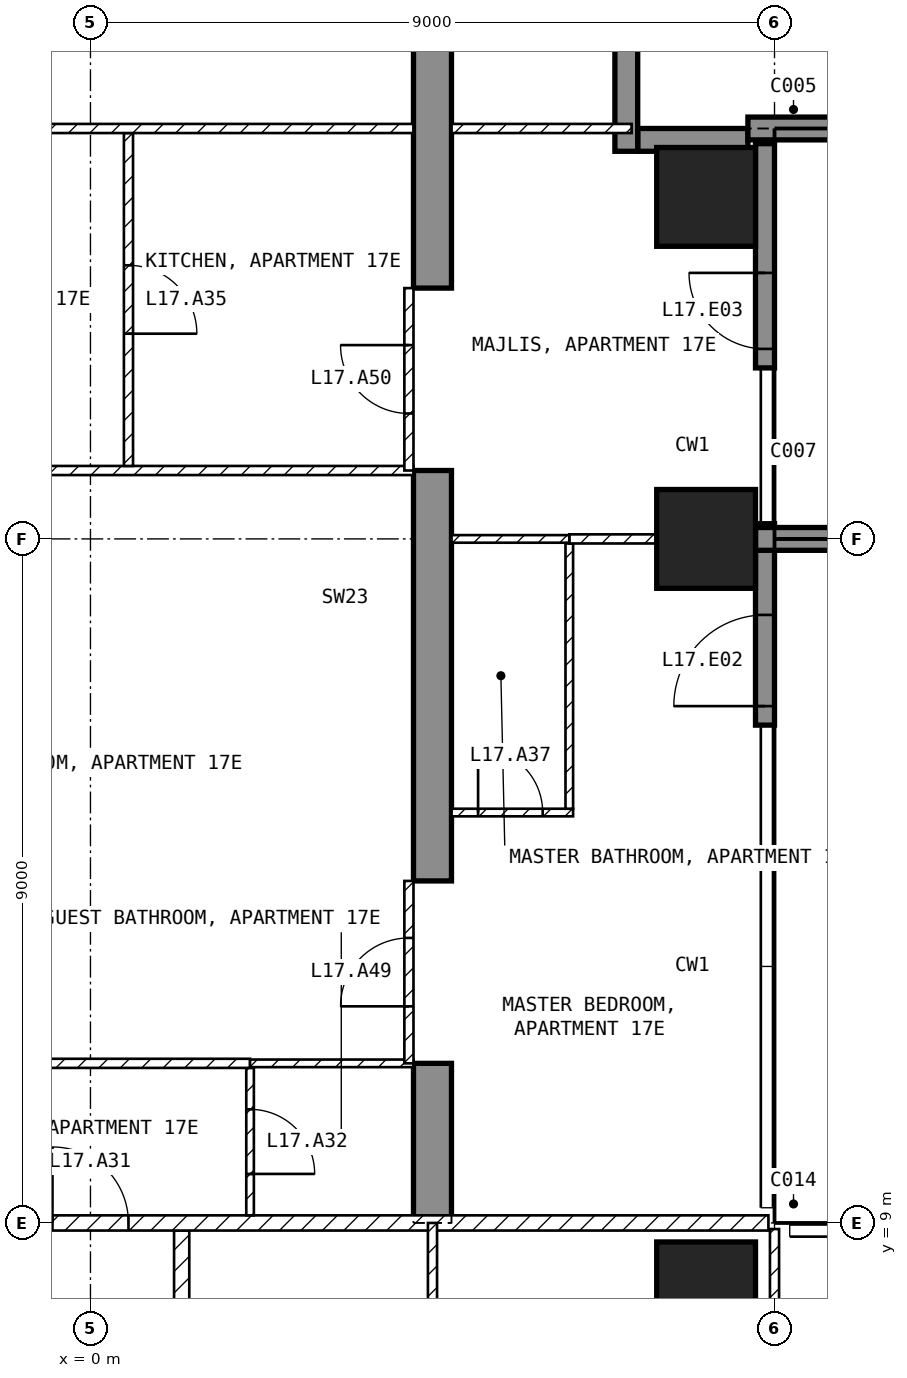
"""IFC4 building model, lengths in metres.
Left out: names, types, materials, properties, quantities, classifications, styles, units other than length and angle.
Written with IfcOpenShell. Run it as: python <this file> out.ifc"""

import sys

from ifc_helpers import new_model, si_unit, direction, frame, frame_2d, origin, origin_2d, place, context, subcontext, project, spatial, polyline, rectangle, outline, extrude, element, fill, save


model = new_model("IFC4")
c1 = context("Model", 3, precision=1e-05, world=origin(), true_north=direction((0.0, 1.0)))
c2 = subcontext(c1, "Body", "Model", "MODEL_VIEW")
j1 = project(units=[si_unit("LENGTHUNIT", "METRE"), si_unit("PLANEANGLEUNIT", "RADIAN")], contexts=[c1])
p1 = place(None, origin())
s1 = spatial("IfcSite", under=j1, at=p1, CompositionType="ELEMENT")
p2 = place(p1, origin())
s2 = spatial("IfcBuilding", under=s1, at=p2, CompositionType="ELEMENT")
p3 = place(p2, frame((0.0, 0.0, 78.5)))
s3 = spatial("IfcBuildingStorey", under=s2, at=p3, CompositionType="ELEMENT", Elevation=78.5)
for number, where, z_axis, x_axis in (
    (1, (8.1, 8.1, -0.25), (0.0, 0.0, 1.0), (1.0, 0.0, 0.0)),
    (2, (8.1, 18.0, -0.25), (0.0, 0.0, 1.0), (1.0, 0.0, 0.0)),
    (3, (8.1, 22.5, -0.25), (0.0, 0.0, 1.0), (1.0, 0.0, 0.0)),
):
    element("IfcColumn", number, at=place(p3, frame(where, z_axis=z_axis, x_axis=x_axis)), inside=s3, PredefinedType="COLUMN", context=c2, shape_type="SweptSolid", body=[
        extrude(rectangle(XDim=1.3, YDim=1.3, at=origin_2d()), origin(), (0.0, 0.0, 1.0), 3.5),
    ])
p4 = place(p3, frame((4.25, 9.0, -0.25), z_axis=(1.0, 0.0, 0.0), x_axis=(0.0, 1.0, 0.0)))
e4 = element("IfcWall", 4, at=p4, inside=s3, PredefinedType="SHEAR", context=c2, shape_type="SweptSolid", body=[
    extrude(outline(polyline([(0.0, 0.0), (2.1, 0.0), (2.1, 2.65), (4.5, 2.65), (4.5, 0.0), (9.9, 0.0), (9.9, 2.65), (12.3, 2.65), (12.3, 0.0), (16.45, 0.0), (16.45, 3.5), (0.0, 3.5), (0.0, 0.0)])), origin(), (0.0, 0.0, 1.0), 0.5),
])
p5 = place(p3, frame((8.875, 15.55, 0.0), z_axis=(0.0, 0.0, 1.0), x_axis=(0.0, 1.0, 0.0)))
e5 = element("IfcWall", 5, at=p5, inside=s3, PredefinedType="SOLIDWALL", context=c2, shape_type="SweptSolid", body=[
    extrude(rectangle(XDim=2.65, YDim=0.25, at=frame_2d((1.325, 0.0))), origin(), (0.0, 0.0, 1.0), 3.25),
])
p6 = place(p5, frame((0.25, 0.0, 0.0)))
e6 = element("IfcOpeningElement", 6, at=p6, cuts=e5, PredefinedType="OPENING", context=c2, shape_type="SweptSolid", body=[
    extrude(rectangle(XDim=1.2, YDim=2.4, at=frame_2d((0.6, 1.2))), frame((0.0, 0.135, 0.0), z_axis=(0.0, -1.0, 0.0), x_axis=(1.0, 0.0, 0.0)), (0.0, 0.0, 1.0), 0.27),
])
p7 = place(p3, frame((8.875, 20.25, 0.0), z_axis=(0.0, 0.0, 1.0), x_axis=(0.0, 1.0, 0.0)))
e7 = element("IfcWall", 7, at=p7, inside=s3, PredefinedType="SOLIDWALL", context=c2, shape_type="SweptSolid", body=[
    extrude(rectangle(XDim=2.95, YDim=0.25, at=frame_2d((1.475, 0.0))), origin(), (0.0, 0.0, 1.0), 3.25),
])
p8 = place(p7, frame((0.25, 0.0, 0.0)))
e8 = element("IfcOpeningElement", 8, at=p8, cuts=e7, PredefinedType="OPENING", context=c2, shape_type="SweptSolid", body=[
    extrude(rectangle(XDim=1.0, YDim=2.4, at=frame_2d((0.5, 1.2))), frame((0.0, 0.135, 0.0), z_axis=(0.0, -1.0, 0.0), x_axis=(1.0, 0.0, 0.0)), (0.0, 0.0, 1.0), 0.27),
])
p9 = place(p3, frame((8.65, 23.25, 0.0), z_axis=(0.0, 0.0, 1.0), x_axis=(-1.0, 0.0, 0.0)))
e9 = element("IfcWall", 9, at=p9, inside=s3, PredefinedType="SOLIDWALL", context=c2, shape_type="SweptSolid", body=[
    extrude(rectangle(XDim=1.45, YDim=0.3, at=frame_2d((0.725, 0.0))), origin(), (0.0, 0.0, 1.0), 3.25),
])
p10 = place(p3, frame((7.05, 23.1, 0.0), z_axis=(0.0, 0.0, 1.0), x_axis=(0.0, 1.0, 0.0)))
e10 = element("IfcWall", 10, at=p10, inside=s3, PredefinedType="SOLIDWALL", context=c2, shape_type="SweptSolid", body=[
    extrude(rectangle(XDim=1.8, YDim=0.3, at=frame_2d((0.9, 0.0))), origin(), (0.0, 0.0, 1.0), 3.25),
])
p11 = place(p3, frame((8.75, 18.0, 0.0), z_axis=(0.0, 0.0, 1.0), x_axis=(1.0, 0.0, 0.0)))
e11 = element("IfcWall", 11, at=p11, inside=s3, PredefinedType="SOLIDWALL", context=c2, shape_type="SweptSolid", body=[
    extrude(rectangle(XDim=2.95, YDim=0.3, at=frame_2d((1.475, 0.0))), origin(), (0.0, 0.0, 1.0), 3.25),
])
p12 = place(p3, frame((8.65, 23.4, 0.0), z_axis=(0.0, 0.0, 1.0), x_axis=(1.0, 0.0, 0.0)))
e12 = element("IfcWall", 12, at=p12, inside=s3, PredefinedType="SOLIDWALL", context=c2, shape_type="SweptSolid", body=[
    extrude(rectangle(XDim=3.05, YDim=0.3, at=frame_2d((1.525, 0.0))), origin(), (0.0, 0.0, 1.0), 3.25),
])
p13 = place(p3, frame((1.2, 8.9, 0.0), z_axis=(0.0, 0.0, 1.0), x_axis=(0.0, -1.0, 0.0)))
e13 = element("IfcWall", 13, at=p13, inside=s3, PredefinedType="PARTITIONING", context=c2, shape_type="SweptSolid", body=[
    extrude(rectangle(XDim=7.6, YDim=0.2, at=frame_2d((3.8, 0.0))), origin(), (0.0, 0.0, 1.0), 3.25),
])
p14 = place(p3, frame((-8.92, 9.0, 0.0), z_axis=(0.0, 0.0, 1.0), x_axis=(1.0, 0.0, 0.0)))
e14 = element("IfcWall", 14, at=p14, inside=s3, PredefinedType="PARTITIONING", context=c2, shape_type="SweptSolid", body=[
    extrude(rectangle(XDim=17.84, YDim=0.2, at=frame_2d((8.92, 0.0))), origin(), (0.0, 0.0, 1.0), 3.25),
])
p15 = place(p14, frame((8.42, 0.0, 0.0)))
e15 = element("IfcOpeningElement", 15, at=p15, cuts=e14, PredefinedType="OPENING", context=c2, shape_type="SweptSolid", body=[
    extrude(rectangle(XDim=1.0, YDim=2.1, at=frame_2d((0.5, 1.05))), frame((0.0, 0.11, 0.0), z_axis=(0.0, -1.0, 0.0), x_axis=(1.0, 0.0, 0.0)), (0.0, 0.0, 1.0), 0.22),
])
p16 = place(p3, frame((9.0, 1.3, 0.0), z_axis=(0.0, 0.0, 1.0), x_axis=(0.0, 1.0, 0.0)))
e16 = element("IfcWall", 16, at=p16, inside=s3, PredefinedType="PARTITIONING", context=c2, shape_type="SweptSolid", body=[
    extrude(rectangle(XDim=7.62, YDim=0.12, at=frame_2d((3.81, 0.0))), origin(), (0.0, 0.0, 1.0), 3.25),
])
p17 = place(p16, frame((4.05, 0.0, 0.0)))
e17 = element("IfcOpeningElement", 17, at=p17, cuts=e16, PredefinedType="OPENING", context=c2, shape_type="SweptSolid", body=[
    extrude(rectangle(XDim=0.9, YDim=2.1, at=frame_2d((0.45, 1.05))), frame((0.0, 0.07, 0.0), z_axis=(0.0, -1.0, 0.0), x_axis=(1.0, 0.0, 0.0)), (0.0, 0.0, 1.0), 0.14),
])
p18 = place(p3, frame((4.5, 1.3, 0.0), z_axis=(0.0, 0.0, 1.0), x_axis=(0.0, 1.0, 0.0)))
e18 = element("IfcWall", 18, at=p18, inside=s3, PredefinedType="PARTITIONING", context=c2, shape_type="SweptSolid", body=[
    extrude(rectangle(XDim=7.7, YDim=0.12, at=frame_2d((3.85, 0.0))), origin(), (0.0, 0.0, 1.0), 3.25),
])
p19 = place(p18, frame((3.4, 0.0, 0.0)))
e19 = element("IfcOpeningElement", 19, at=p19, cuts=e18, PredefinedType="OPENING", context=c2, shape_type="SweptSolid", body=[
    extrude(rectangle(XDim=0.9, YDim=2.1, at=frame_2d((0.45, 1.05))), frame((0.0, 0.07, 0.0), z_axis=(0.0, -1.0, 0.0), x_axis=(1.0, 0.0, 0.0)), (0.0, 0.0, 1.0), 0.14),
])
p20 = place(p3, frame((2.1, 11.04, 0.0), z_axis=(0.0, 0.0, 1.0), x_axis=(0.0, -1.0, 0.0)))
e20 = element("IfcWall", 20, at=p20, inside=s3, PredefinedType="PARTITIONING", context=c2, shape_type="SweptSolid", body=[
    extrude(rectangle(XDim=1.94, YDim=0.1, at=frame_2d((0.97, 0.0))), origin(), (0.0, 0.0, 1.0), 3.25),
])
p21 = place(p20, frame((0.545, 0.0, 0.0)))
e21 = element("IfcOpeningElement", 21, at=p21, cuts=e20, PredefinedType="OPENING", context=c2, shape_type="SweptSolid", body=[
    extrude(rectangle(XDim=0.85, YDim=2.1, at=frame_2d((0.425, 1.05))), frame((0.0, 0.06, 0.0), z_axis=(0.0, -1.0, 0.0), x_axis=(1.0, 0.0, 0.0)), (0.0, 0.0, 1.0), 0.12),
])
p22 = place(p3, frame((-4.25, 11.1, 0.0), z_axis=(0.0, 0.0, 1.0), x_axis=(1.0, 0.0, 0.0)))
e22 = element("IfcWall", 22, at=p22, inside=s3, PredefinedType="PARTITIONING", context=c2, shape_type="SweptSolid", body=[
    extrude(rectangle(XDim=6.35, YDim=0.12, at=frame_2d((3.175, 0.0))), origin(), (0.0, 0.0, 1.0), 3.25),
])
p23 = place(p22, frame((2.725, 0.0, 0.0)))
e23 = element("IfcOpeningElement", 23, at=p23, cuts=e22, PredefinedType="OPENING", context=c2, shape_type="SweptSolid", body=[
    extrude(rectangle(XDim=0.9, YDim=2.1, at=frame_2d((0.45, 1.05))), frame((0.0, 0.07, 0.0), z_axis=(0.0, -1.0, 0.0), x_axis=(1.0, 0.0, 0.0)), (0.0, 0.0, 1.0), 0.14),
])
p24 = place(p3, frame((2.1, 11.1, 0.0), z_axis=(0.0, 0.0, 1.0), x_axis=(1.0, 0.0, 0.0)))
e24 = element("IfcWall", 24, at=p24, inside=s3, PredefinedType="PARTITIONING", context=c2, shape_type="SweptSolid", body=[
    extrude(rectangle(XDim=2.15, YDim=0.1, at=frame_2d((1.075, 0.0))), origin(), (0.0, 0.0, 1.0), 3.25),
])
p25 = place(p3, frame((-4.25, 18.9, 0.0), z_axis=(0.0, 0.0, 1.0), x_axis=(1.0, 0.0, 0.0)))
e25 = element("IfcWall", 25, at=p25, inside=s3, PredefinedType="PARTITIONING", context=c2, shape_type="SweptSolid", body=[
    extrude(rectangle(XDim=8.5, YDim=0.12, at=frame_2d((4.25, 0.0))), origin(), (0.0, 0.0, 1.0), 3.25),
])
p26 = place(p25, frame((1.925, 0.0, 0.0)))
e26 = element("IfcOpeningElement", 26, at=p26, cuts=e25, PredefinedType="OPENING", context=c2, shape_type="SweptSolid", body=[
    extrude(rectangle(XDim=0.9, YDim=2.1, at=frame_2d((0.45, 1.05))), frame((0.0, 0.07, 0.0), z_axis=(0.0, -1.0, 0.0), x_axis=(1.0, 0.0, 0.0)), (0.0, 0.0, 1.0), 0.14),
])
p27 = place(p3, frame((0.5, 23.34, 0.0), z_axis=(0.0, 0.0, 1.0), x_axis=(0.0, -1.0, 0.0)))
e27 = element("IfcWall", 27, at=p27, inside=s3, PredefinedType="PARTITIONING", context=c2, shape_type="SweptSolid", body=[
    extrude(rectangle(XDim=4.38, YDim=0.12, at=frame_2d((2.19, 0.0))), origin(), (0.0, 0.0, 1.0), 3.25),
])
p28 = place(p27, frame((1.74, 0.0, 0.0)))
e28 = element("IfcOpeningElement", 28, at=p28, cuts=e27, PredefinedType="OPENING", context=c2, shape_type="SweptSolid", body=[
    extrude(rectangle(XDim=0.9, YDim=2.1, at=frame_2d((0.45, 1.05))), frame((0.0, 0.07, 0.0), z_axis=(0.0, -1.0, 0.0), x_axis=(1.0, 0.0, 0.0)), (0.0, 0.0, 1.0), 0.14),
])
p29 = place(p3, frame((-4.25, 23.4, 0.0), z_axis=(0.0, 0.0, 1.0), x_axis=(1.0, 0.0, 0.0)))
e29 = element("IfcWall", 29, at=p29, inside=s3, PredefinedType="PARTITIONING", context=c2, shape_type="SweptSolid", body=[
    extrude(rectangle(XDim=8.5, YDim=0.12, at=frame_2d((4.25, 0.0))), origin(), (0.0, 0.0, 1.0), 3.25),
])
p30 = place(p29, frame((1.925, 0.0, 0.0)))
e30 = element("IfcOpeningElement", 30, at=p30, cuts=e29, PredefinedType="OPENING", context=c2, shape_type="SweptSolid", body=[
    extrude(rectangle(XDim=0.9, YDim=2.1, at=frame_2d((0.45, 1.05))), frame((0.0, 0.07, 0.0), z_axis=(0.0, -1.0, 0.0), x_axis=(1.0, 0.0, 0.0)), (0.0, 0.0, 1.0), 0.14),
])
p31 = place(p3, frame((4.75, 14.4, 0.0), z_axis=(0.0, 0.0, 1.0), x_axis=(1.0, 0.0, 0.0)))
e31 = element("IfcWall", 31, at=p31, inside=s3, PredefinedType="PARTITIONING", context=c2, shape_type="SweptSolid", body=[
    extrude(rectangle(XDim=1.6, YDim=0.1, at=frame_2d((0.8, 0.0))), origin(), (0.0, 0.0, 1.0), 3.25),
])
p32 = place(p31, frame((0.35, 0.0, 0.0)))
e32 = element("IfcOpeningElement", 32, at=p32, cuts=e31, PredefinedType="OPENING", context=c2, shape_type="SweptSolid", body=[
    extrude(rectangle(XDim=0.85, YDim=2.1, at=frame_2d((0.425, 1.05))), frame((0.0, 0.06, 0.0), z_axis=(0.0, -1.0, 0.0), x_axis=(1.0, 0.0, 0.0)), (0.0, 0.0, 1.0), 0.12),
])
p33 = place(p3, frame((6.3, 14.45, 0.0), z_axis=(0.0, 0.0, 1.0), x_axis=(0.0, 1.0, 0.0)))
e33 = element("IfcWall", 33, at=p33, inside=s3, PredefinedType="PARTITIONING", context=c2, shape_type="SweptSolid", body=[
    extrude(rectangle(XDim=3.49, YDim=0.1, at=frame_2d((1.745, 0.0))), origin(), (0.0, 0.0, 1.0), 3.25),
])
p34 = place(p3, frame((6.3, 18.0, 0.0), z_axis=(0.0, 0.0, 1.0), x_axis=(1.0, 0.0, 0.0)))
e34 = element("IfcWall", 34, at=p34, inside=s3, PredefinedType="PARTITIONING", context=c2, shape_type="SweptSolid", body=[
    extrude(rectangle(XDim=1.15, YDim=0.12, at=frame_2d((0.575, 0.0))), origin(), (0.0, 0.0, 1.0), 2.346),
])
p35 = place(p3, frame((4.75, 18.0, 0.0), z_axis=(0.0, 0.0, 1.0), x_axis=(1.0, 0.0, 0.0)))
e35 = element("IfcWall", 35, at=p35, inside=s3, PredefinedType="PARTITIONING", context=c2, shape_type="SweptSolid", body=[
    extrude(rectangle(XDim=1.55, YDim=0.1, at=frame_2d((0.775, 0.0))), origin(), (0.0, 0.0, 1.0), 2.346),
])
p36 = place(p3, frame((4.75, 23.4, 0.0), z_axis=(0.0, 0.0, 1.0), x_axis=(1.0, 0.0, 0.0)))
e36 = element("IfcWall", 36, at=p36, inside=s3, PredefinedType="PARTITIONING", context=c2, shape_type="SweptSolid", body=[
    extrude(rectangle(XDim=2.37, YDim=0.12, at=frame_2d((1.185, 0.0))), origin(), (0.0, 0.0, 1.0), 3.25),
])
p37 = place(p3, frame((4.19, 11.1, 0.0), z_axis=(0.0, 0.0, 1.0), x_axis=(0.0, 1.0, 0.0)))
e37 = element("IfcWall", 37, at=p37, inside=s3, PredefinedType="PARTITIONING", context=c2, shape_type="SweptSolid", body=[
    extrude(rectangle(XDim=2.4, YDim=0.12, at=frame_2d((1.2, 0.0))), origin(), (0.0, 0.0, 1.0), 2.4),
])
p38 = place(p37, frame((0.75, 0.0, 0.0)))
e38 = element("IfcOpeningElement", 38, at=p38, cuts=e37, PredefinedType="OPENING", context=c2, shape_type="SweptSolid", body=[
    extrude(rectangle(XDim=0.9, YDim=2.1, at=frame_2d((0.45, 1.05))), frame((0.0, 0.07, 0.0), z_axis=(0.0, -1.0, 0.0), x_axis=(1.0, 0.0, 0.0)), (0.0, 0.0, 1.0), 0.14),
])
p39 = place(p3, frame((4.19, 18.9, 0.0), z_axis=(0.0, 0.0, 1.0), x_axis=(0.0, 1.0, 0.0)))
e39 = element("IfcWall", 39, at=p39, inside=s3, PredefinedType="PARTITIONING", context=c2, shape_type="SweptSolid", body=[
    extrude(rectangle(XDim=2.4, YDim=0.12, at=frame_2d((1.2, 0.0))), origin(), (0.0, 0.0, 1.0), 2.4),
])
p40 = place(p39, frame((0.75, 0.0, 0.0)))
e40 = element("IfcOpeningElement", 40, at=p40, cuts=e39, PredefinedType="OPENING", context=c2, shape_type="SweptSolid", body=[
    extrude(rectangle(XDim=0.9, YDim=2.1, at=frame_2d((0.45, 1.05))), frame((0.0, 0.07, 0.0), z_axis=(0.0, -1.0, 0.0), x_axis=(1.0, 0.0, 0.0)), (0.0, 0.0, 1.0), 0.14),
])
p41 = place(p6, origin())
e41 = element("IfcDoor", 41, at=p41, inside=s3, OperationType="SINGLE_SWING_LEFT", PredefinedType="DOOR", context=c2, shape_type="SweptSolid", body=[
    extrude(rectangle(XDim=1.2, YDim=2.4, at=frame_2d((0.6, 1.2))), frame((0.0, 0.025, 0.0), z_axis=(0.0, -1.0, 0.0), x_axis=(1.0, 0.0, 0.0)), (0.0, 0.0, 1.0), 0.05),
])
fill(e6, e41)
p42 = place(p8, origin())
e42 = element("IfcDoor", 42, at=p42, inside=s3, OperationType="SINGLE_SWING_RIGHT", PredefinedType="DOOR", context=c2, shape_type="SweptSolid", body=[
    extrude(rectangle(XDim=1.0, YDim=2.4, at=frame_2d((0.5, 1.2))), frame((0.0, 0.025, 0.0), z_axis=(0.0, -1.0, 0.0), x_axis=(1.0, 0.0, 0.0)), (0.0, 0.0, 1.0), 0.05),
])
fill(e8, e42)
p43 = place(p15, origin())
e43 = element("IfcDoor", 43, at=p43, inside=s3, OperationType="SINGLE_SWING_LEFT", PredefinedType="DOOR", context=c2, shape_type="SweptSolid", body=[
    extrude(rectangle(XDim=1.0, YDim=2.1, at=frame_2d((0.5, 1.05))), frame((0.0, 0.025, 0.0), z_axis=(0.0, -1.0, 0.0), x_axis=(1.0, 0.0, 0.0)), (0.0, 0.0, 1.0), 0.05),
])
fill(e15, e43)
p44 = place(p21, origin())
e44 = element("IfcDoor", 44, at=p44, inside=s3, OperationType="SINGLE_SWING_RIGHT", PredefinedType="DOOR", context=c2, shape_type="SweptSolid", body=[
    extrude(rectangle(XDim=0.85, YDim=2.1, at=frame_2d((0.425, 1.05))), frame((0.0, 0.025, 0.0), z_axis=(0.0, -1.0, 0.0), x_axis=(1.0, 0.0, 0.0)), (0.0, 0.0, 1.0), 0.05),
])
fill(e21, e44)
p45 = place(p28, origin())
e45 = element("IfcDoor", 45, at=p45, inside=s3, OperationType="SINGLE_SWING_RIGHT", PredefinedType="DOOR", context=c2, shape_type="SweptSolid", body=[
    extrude(rectangle(XDim=0.9, YDim=2.1, at=frame_2d((0.45, 1.05))), frame((0.0, 0.025, 0.0), z_axis=(0.0, -1.0, 0.0), x_axis=(1.0, 0.0, 0.0)), (0.0, 0.0, 1.0), 0.05),
])
fill(e28, e45)
p46 = place(p32, origin())
e46 = element("IfcDoor", 46, at=p46, inside=s3, OperationType="SINGLE_SWING_LEFT", PredefinedType="DOOR", context=c2, shape_type="SweptSolid", body=[
    extrude(rectangle(XDim=0.85, YDim=2.1, at=frame_2d((0.425, 1.05))), frame((0.0, 0.025, 0.0), z_axis=(0.0, -1.0, 0.0), x_axis=(1.0, 0.0, 0.0)), (0.0, 0.0, 1.0), 0.05),
])
fill(e32, e46)
p47 = place(p38, origin())
e47 = element("IfcDoor", 47, at=p47, inside=s3, OperationType="SINGLE_SWING_LEFT", PredefinedType="DOOR", context=c2, shape_type="SweptSolid", body=[
    extrude(rectangle(XDim=0.9, YDim=2.1, at=frame_2d((0.45, 1.05))), frame((0.0, 0.025, 0.0), z_axis=(0.0, -1.0, 0.0), x_axis=(1.0, 0.0, 0.0)), (0.0, 0.0, 1.0), 0.05),
])
fill(e38, e47)
p48 = place(p40, origin())
e48 = element("IfcDoor", 48, at=p48, inside=s3, OperationType="SINGLE_SWING_RIGHT", PredefinedType="DOOR", context=c2, shape_type="SweptSolid", body=[
    extrude(rectangle(XDim=0.9, YDim=2.1, at=frame_2d((0.45, 1.05))), frame((0.0, 0.025, 0.0), z_axis=(0.0, -1.0, 0.0), x_axis=(1.0, 0.0, 0.0)), (0.0, 0.0, 1.0), 0.05),
])
fill(e40, e48)
save(model, sys.argv[1])
